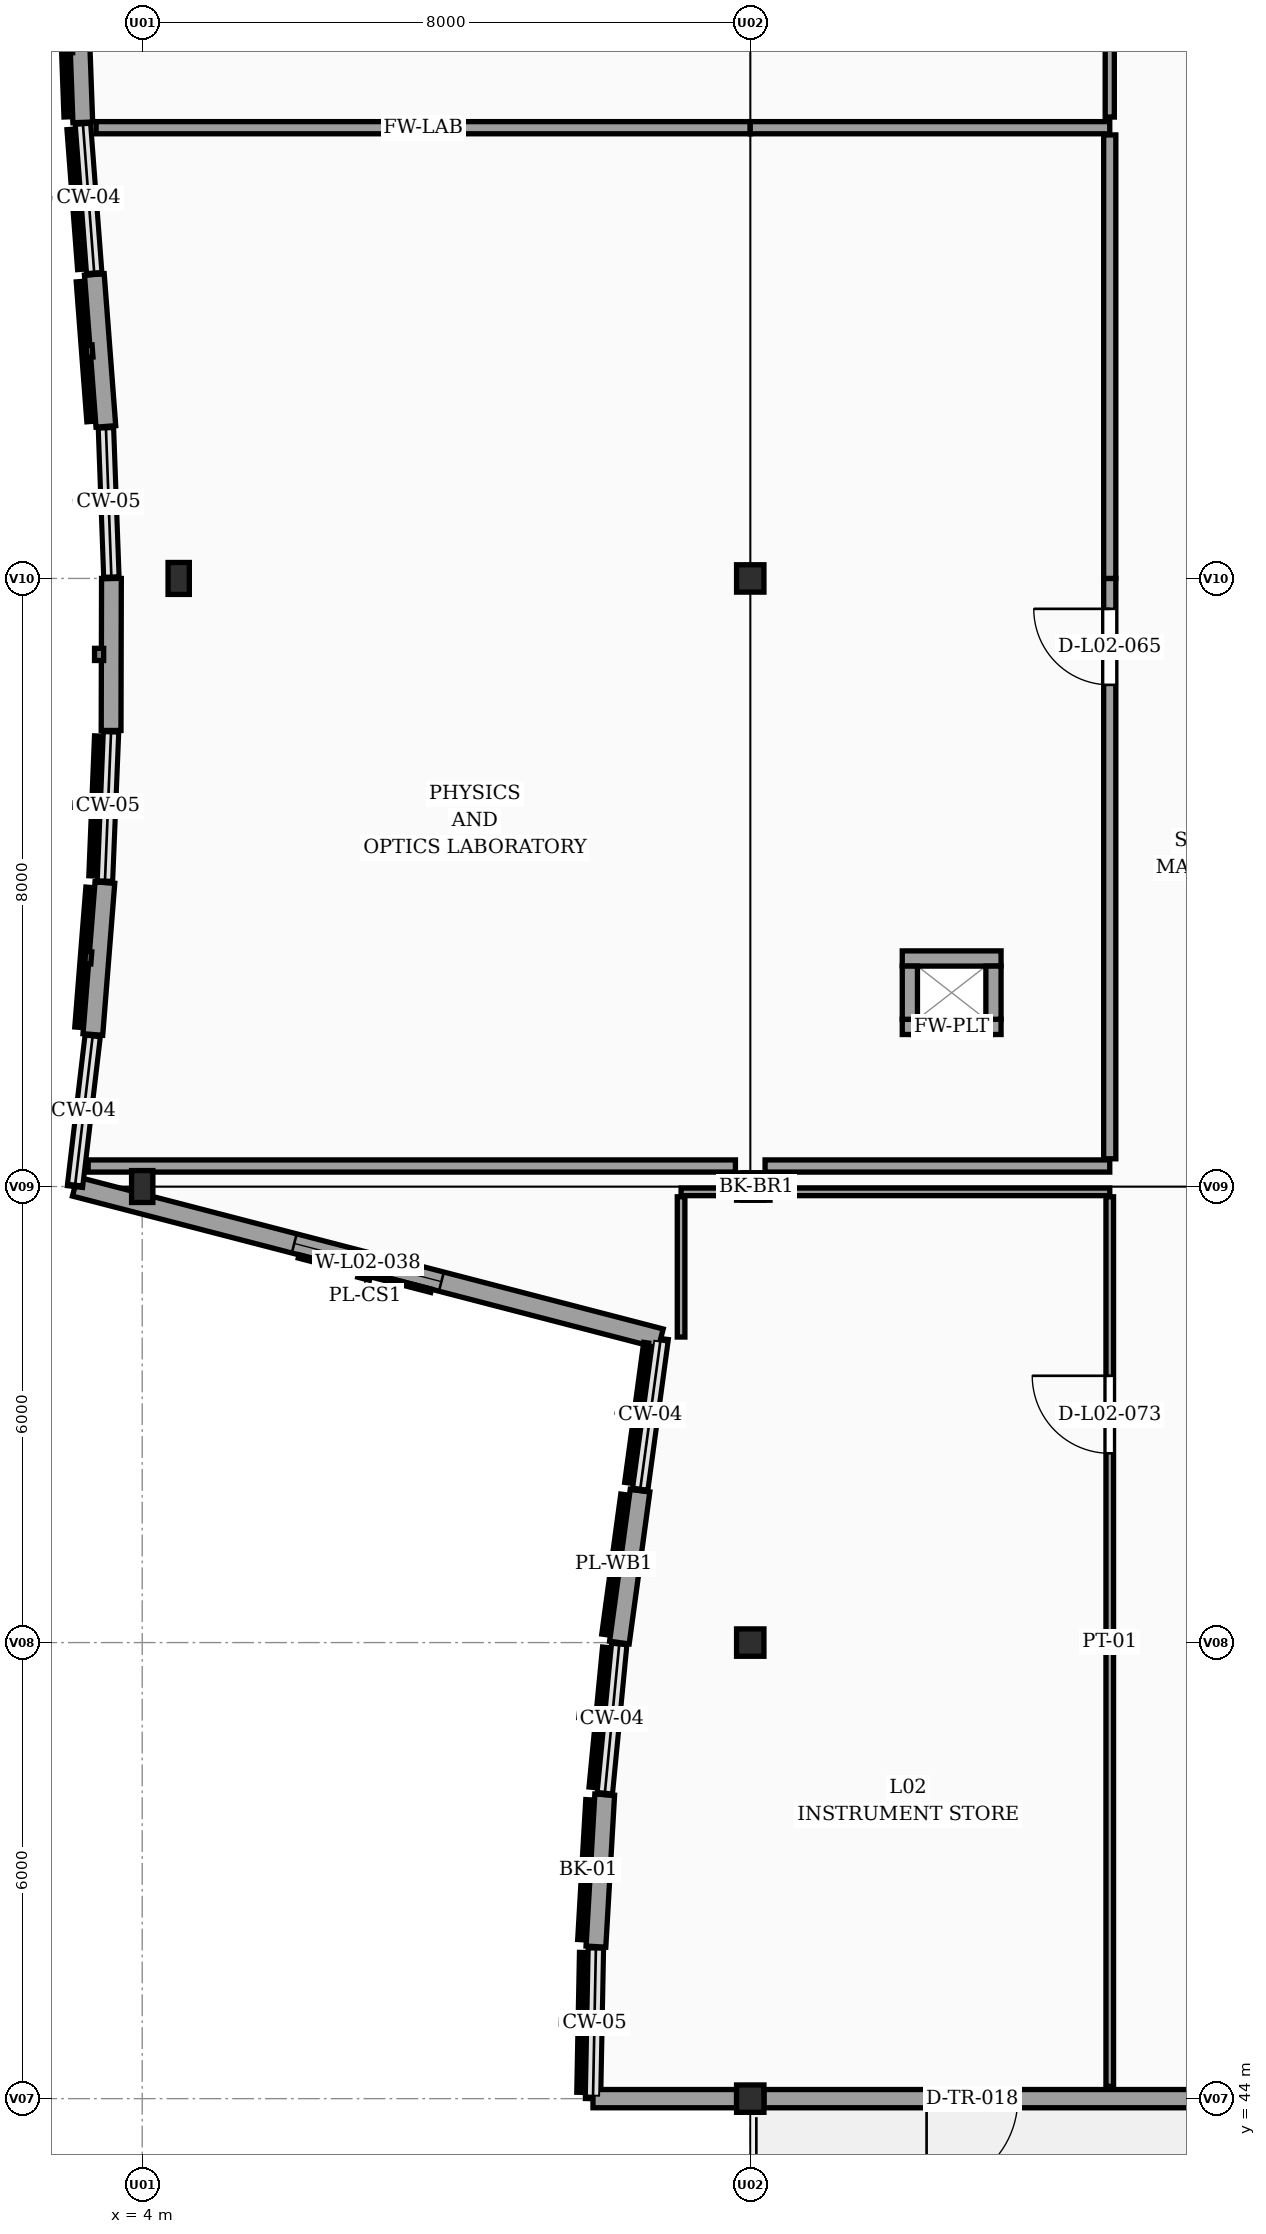
"""IFC4 building model, lengths in metres.
Left out: names, types, materials, properties, quantities, classifications, styles, units other than length and angle.
Written with IfcOpenShell. Run it as: python <this file> out.ifc"""

import sys

from ifc_helpers import new_model, si_unit, direction, frame, frame_2d, origin, origin_2d, place, context, subcontext, project, spatial, rectangle, extrude, element, fill, save


model = new_model("IFC4")
c1 = context("Model", 3, precision=1e-05, world=origin(), true_north=direction((0.0, 1.0)))
c2 = subcontext(c1, "Body", "Model", "MODEL_VIEW")
j1 = project(units=[si_unit("LENGTHUNIT", "METRE"), si_unit("PLANEANGLEUNIT", "RADIAN")], contexts=[c1])
p1 = place(None, origin())
s1 = spatial("IfcSite", under=j1, at=p1, CompositionType="ELEMENT")
p2 = place(p1, origin())
s2 = spatial("IfcBuilding", under=s1, at=p2, CompositionType="ELEMENT")
p3 = place(p2, frame((0.0, 0.0, 8.4)))
s3 = spatial("IfcBuildingStorey", under=s2, at=p3, CompositionType="ELEMENT", Elevation=8.4)
for number, where, z_axis, x_axis in (
    (1, (4.0, 56.0, 0.0), (0.0, 0.0, 1.0), (1.0, 0.0, 0.0)),
    (2, (4.48, 64.0, 0.0), (0.0, 0.0, 1.0), (1.0, 0.0, 0.0)),
):
    element("IfcColumn", number, at=place(p3, frame(where, z_axis=z_axis, x_axis=x_axis)), inside=s3, PredefinedType="PILASTER", context=c2, shape_type="SweptSolid", body=[
        extrude(rectangle(XDim=0.28, YDim=0.42, at=origin_2d()), origin(), (0.0, 0.0, 1.0), 3.9),
    ])
for number, where, z_axis, x_axis in (
    (3, (12.0, 44.0, 0.0), (0.0, 0.0, 1.0), (1.0, 0.0, 0.0)),
    (4, (12.0, 50.0, 0.0), (0.0, 0.0, 1.0), (1.0, 0.0, 0.0)),
    (5, (12.0, 56.0, 0.0), (0.0, 0.0, 1.0), (1.0, 0.0, 0.0)),
    (6, (12.0, 64.0, 0.0), (0.0, 0.0, 1.0), (1.0, 0.0, 0.0)),
):
    element("IfcColumn", number, at=place(p3, frame(where, z_axis=z_axis, x_axis=x_axis)), inside=s3, PredefinedType="COLUMN", context=c2, shape_type="SweptSolid", body=[
        extrude(rectangle(XDim=0.36, YDim=0.36, at=origin_2d()), origin(), (0.0, 0.0, 1.0), 3.9),
    ])
p4 = place(p3, frame((9.931, 44.0, 0.0), z_axis=(0.0, 0.0, 1.0), x_axis=(0.019283523045, 0.999814055582, 0.0)))
e7 = element("IfcWall", 7, at=p4, inside=s3, PredefinedType="SOLIDWALL", context=c2, shape_type="SweptSolid", body=[
    extrude(rectangle(XDim=2.0, YDim=0.2, at=frame_2d((1.0, 0.0))), origin(), (0.0, 0.0, 1.0), 0.95),
])
p5 = place(p3, frame((9.969, 46.0, 0.0), z_axis=(0.0, 0.0, 1.0), x_axis=(0.057643251596, 0.998337245396, 0.0)))
e8 = element("IfcWall", 8, at=p5, inside=s3, PredefinedType="SOLIDWALL", context=c2, shape_type="SweptSolid", body=[
    extrude(rectangle(XDim=2.003, YDim=0.26, at=frame_2d((1.002, 0.0))), origin(), (0.0, 0.0, 1.0), 3.65),
])
p6 = place(p3, frame((10.085, 48.0, 0.0), z_axis=(0.0, 0.0, 1.0), x_axis=(0.09623099978, 0.99535902803, 0.0)))
e9 = element("IfcWall", 9, at=p6, inside=s3, PredefinedType="SOLIDWALL", context=c2, shape_type="SweptSolid", body=[
    extrude(rectangle(XDim=2.009, YDim=0.2, at=frame_2d((1.005, 0.0))), origin(), (0.0, 0.0, 1.0), 0.95),
])
p7 = place(p3, frame((10.278, 50.0, 0.0), z_axis=(0.0, 0.0, 1.0), x_axis=(0.134627389588, 0.990896294257, 0.0)))
e10 = element("IfcWall", 10, at=p7, inside=s3, PredefinedType="SOLIDWALL", context=c2, shape_type="SweptSolid", body=[
    extrude(rectangle(XDim=2.018, YDim=0.26, at=frame_2d((1.009, 0.0))), origin(), (0.0, 0.0, 1.0), 3.65),
])
p8 = place(p3, frame((10.55, 52.0, 0.0), z_axis=(0.0, 0.0, 1.0), x_axis=(0.134627389588, 0.990896294257, 0.0)))
e11 = element("IfcWall", 11, at=p8, inside=s3, PredefinedType="SOLIDWALL", context=c2, shape_type="SweptSolid", body=[
    extrude(rectangle(XDim=2.018, YDim=0.2, at=frame_2d((1.009, 0.0))), origin(), (0.0, 0.0, 1.0), 0.95),
])
p9 = place(p3, frame((10.822, 54.0, 0.0), z_axis=(0.0, 0.0, 1.0), x_axis=(-0.967937555254, 0.251190941573, 0.0)))
e12 = element("IfcWall", 12, at=p9, inside=s3, PredefinedType="SOLIDWALL", context=c2, shape_type="SweptSolid", body=[
    extrude(rectangle(XDim=7.962, YDim=0.26, at=frame_2d((3.981, 0.0))), origin(), (0.0, 0.0, 1.0), 3.65),
])
p10 = place(p9, frame((2.981, 0.0, 0.95)))
e13 = element("IfcOpeningElement", 13, at=p10, cuts=e12, PredefinedType="OPENING", context=c2, shape_type="SweptSolid", body=[
    extrude(rectangle(XDim=2.0, YDim=1.5, at=frame_2d((1.0, 0.75))), frame((0.0, 0.14, 0.0), z_axis=(0.0, -1.0, 0.0), x_axis=(1.0, 0.0, 0.0)), (0.0, 0.0, 1.0), 0.28),
])
p11 = place(p3, frame((3.115, 56.0, 0.0), z_axis=(0.0, 0.0, 1.0), x_axis=(0.116988959085, 0.99313321536, 0.0)))
e14 = element("IfcWall", 14, at=p11, inside=s3, PredefinedType="SOLIDWALL", context=c2, shape_type="SweptSolid", body=[
    extrude(rectangle(XDim=2.014, YDim=0.2, at=frame_2d((1.007, 0.0))), origin(), (0.0, 0.0, 1.0), 0.95),
])
p12 = place(p3, frame((3.351, 58.0, 0.0), z_axis=(0.0, 0.0, 1.0), x_axis=(0.078976178075, 0.996876503533, 0.0)))
e15 = element("IfcWall", 15, at=p12, inside=s3, PredefinedType="SOLIDWALL", context=c2, shape_type="SweptSolid", body=[
    extrude(rectangle(XDim=2.006, YDim=0.26, at=frame_2d((1.003, 0.0))), origin(), (0.0, 0.0, 1.0), 3.65),
])
p13 = place(p3, frame((3.509, 60.0, 0.0), z_axis=(0.0, 0.0, 1.0), x_axis=(0.040737639062, 0.99916987783, 0.0)))
e16 = element("IfcWall", 16, at=p13, inside=s3, PredefinedType="SOLIDWALL", context=c2, shape_type="SweptSolid", body=[
    extrude(rectangle(XDim=2.002, YDim=0.2, at=frame_2d((1.001, 0.0))), origin(), (0.0, 0.0, 1.0), 0.95),
])
p14 = place(p3, frame((3.591, 62.0, 0.0), z_axis=(0.0, 0.0, 1.0), x_axis=(0.002197260321, 0.999997586021, 0.0)))
e17 = element("IfcWall", 17, at=p14, inside=s3, PredefinedType="SOLIDWALL", context=c2, shape_type="SweptSolid", body=[
    extrude(rectangle(XDim=2.0, YDim=0.26, at=frame_2d((1.0, 0.0))), origin(), (0.0, 0.0, 1.0), 3.65),
])
p15 = place(p3, frame((3.595, 64.0, 0.0), z_axis=(0.0, 0.0, 1.0), x_axis=(-0.036596562065, 0.999330121454, 0.0)))
e18 = element("IfcWall", 18, at=p15, inside=s3, PredefinedType="SOLIDWALL", context=c2, shape_type="SweptSolid", body=[
    extrude(rectangle(XDim=2.001, YDim=0.2, at=frame_2d((1.0, 0.0))), origin(), (0.0, 0.0, 1.0), 0.95),
])
p16 = place(p3, frame((3.522, 66.0, 0.0), z_axis=(0.0, 0.0, 1.0), x_axis=(-0.075588789742, 0.997139074987, 0.0)))
e19 = element("IfcWall", 19, at=p16, inside=s3, PredefinedType="SOLIDWALL", context=c2, shape_type="SweptSolid", body=[
    extrude(rectangle(XDim=2.006, YDim=0.26, at=frame_2d((1.003, 0.0))), origin(), (0.0, 0.0, 1.0), 3.65),
])
p17 = place(p3, frame((3.37, 68.0, 0.0), z_axis=(0.0, 0.0, 1.0), x_axis=(-0.075709813676, 0.9971298933, 0.0)))
e20 = element("IfcWall", 20, at=p17, inside=s3, PredefinedType="SOLIDWALL", context=c2, shape_type="SweptSolid", body=[
    extrude(rectangle(XDim=2.006, YDim=0.2, at=frame_2d((1.003, 0.0))), origin(), (0.0, 0.0, 1.0), 0.95),
])
p18 = place(p3, frame((3.218, 70.0, 0.0), z_axis=(0.0, 0.0, 1.0), x_axis=(-0.036596562065, 0.999330121454, 0.0)))
e21 = element("IfcWall", 21, at=p18, inside=s3, PredefinedType="SOLIDWALL", context=c2, shape_type="SweptSolid", body=[
    extrude(rectangle(XDim=2.001, YDim=0.26, at=frame_2d((1.0, 0.0))), origin(), (0.0, 0.0, 1.0), 3.65),
])
p19 = place(p3, frame((19.82, 44.0, 0.0), z_axis=(0.0, 0.0, 1.0), x_axis=(-1.0, 0.0, 0.0)))
e22 = element("IfcWall", 22, at=p19, inside=s3, PredefinedType="SOLIDWALL", context=c2, shape_type="SweptSolid", body=[
    extrude(rectangle(XDim=7.64, YDim=0.24, at=frame_2d((3.82, 0.0))), origin(), (0.0, 0.0, 1.0), 3.088),
])
p20 = place(p19, frame((4.3, 0.0, 0.0)))
e23 = element("IfcOpeningElement", 23, at=p20, cuts=e22, PredefinedType="OPENING", context=c2, shape_type="SweptSolid", body=[
    extrude(rectangle(XDim=1.2, YDim=2.15, at=frame_2d((0.6, 1.075))), frame((0.0, 0.13, 0.0), z_axis=(0.0, -1.0, 0.0), x_axis=(1.0, 0.0, 0.0)), (0.0, 0.0, 1.0), 0.26),
])
p21 = place(p3, frame((11.82, 44.0, 0.0), z_axis=(0.0, 0.0, 1.0), x_axis=(-1.0, 0.0, 0.0)))
e24 = element("IfcWall", 24, at=p21, inside=s3, PredefinedType="SOLIDWALL", context=c2, shape_type="SweptSolid", body=[
    extrude(rectangle(XDim=1.889, YDim=0.24, at=frame_2d((0.945, 0.0))), origin(), (0.0, 0.0, 1.0), 3.09),
])
for number, where, z_axis, x_axis in (
    (25, (15.3, 58.1, 0.0), (0.0, 0.0, 1.0), (-1.0, 0.0, 0.0)),
    (26, (14.0, 59.0, 0.0), (0.0, 0.0, 1.0), (1.0, 0.0, 0.0)),
):
    element("IfcWall", number, at=place(p3, frame(where, z_axis=z_axis, x_axis=x_axis)), inside=s3, PredefinedType="PARTITIONING", context=c2, shape_type="SweptSolid", body=[
        extrude(rectangle(XDim=1.3, YDim=0.2, at=frame_2d((0.65, 0.0))), origin(), (0.0, 0.0, 1.0), 3.65),
    ])
for number, where, z_axis, x_axis in (
    (27, (14.1, 58.2, 0.0), (0.0, 0.0, 1.0), (0.0, 1.0, 0.0)),
    (28, (15.2, 58.9, 0.0), (0.0, 0.0, 1.0), (0.0, -1.0, 0.0)),
):
    element("IfcWall", number, at=place(p3, frame(where, z_axis=z_axis, x_axis=x_axis)), inside=s3, PredefinedType="PARTITIONING", context=c2, shape_type="SweptSolid", body=[
        extrude(rectangle(XDim=0.7, YDim=0.2, at=frame_2d((0.35, 0.0))), origin(), (0.0, 0.0, 1.0), 3.65),
    ])
p22 = place(p3, frame((3.289, 56.27, 0.0), z_axis=(0.0, 0.0, 1.0), x_axis=(1.0, 0.0, 0.0)))
e29 = element("IfcWall", 29, at=p22, inside=s3, PredefinedType="PARTITIONING", context=c2, shape_type="SweptSolid", body=[
    extrude(rectangle(XDim=8.516, YDim=0.16, at=frame_2d((4.258, 0.0))), origin(), (0.0, 0.0, 1.0), 3.09),
])
p23 = place(p3, frame((12.195, 56.27, 0.0), z_axis=(0.0, 0.0, 1.0), x_axis=(1.0, 0.0, 0.0)))
e30 = element("IfcWall", 30, at=p23, inside=s3, PredefinedType="PARTITIONING", context=c2, shape_type="SweptSolid", body=[
    extrude(rectangle(XDim=4.535, YDim=0.16, at=frame_2d((2.268, 0.0))), origin(), (0.0, 0.0, 1.0), 3.088),
])
p24 = place(p3, frame((3.393, 69.93, 0.0), z_axis=(0.0, 0.0, 1.0), x_axis=(1.0, 0.0, 0.0)))
e31 = element("IfcWall", 31, at=p24, inside=s3, PredefinedType="PARTITIONING", context=c2, shape_type="SweptSolid", body=[
    extrude(rectangle(XDim=8.607, YDim=0.16, at=frame_2d((4.304, 0.0))), origin(), (0.0, 0.0, 1.0), 3.65),
])
p25 = place(p3, frame((12.0, 69.93, 0.0), z_axis=(0.0, 0.0, 1.0), x_axis=(1.0, 0.0, 0.0)))
e32 = element("IfcWall", 32, at=p25, inside=s3, PredefinedType="PARTITIONING", context=c2, shape_type="SweptSolid", body=[
    extrude(rectangle(XDim=4.73, YDim=0.16, at=frame_2d((2.365, 0.0))), origin(), (0.0, 0.0, 1.0), 3.65),
])
p26 = place(p3, frame((16.73, 56.365, 0.0), z_axis=(0.0, 0.0, 1.0), x_axis=(0.0, 1.0, 0.0)))
e33 = element("IfcWall", 33, at=p26, inside=s3, PredefinedType="PARTITIONING", context=c2, shape_type="SweptSolid", body=[
    extrude(rectangle(XDim=7.635, YDim=0.16, at=frame_2d((3.817, 0.0))), origin(), (0.0, 0.0, 1.0), 3.65),
])
p27 = place(p26, frame((6.235, 0.0, 0.0)))
e34 = element("IfcOpeningElement", 34, at=p27, cuts=e33, PredefinedType="OPENING", context=c2, shape_type="SweptSolid", body=[
    extrude(rectangle(XDim=1.0, YDim=2.15, at=frame_2d((0.5, 1.075))), frame((0.0, 0.09, 0.0), z_axis=(0.0, -1.0, 0.0), x_axis=(1.0, 0.0, 0.0)), (0.0, 0.0, 1.0), 0.18),
])
p28 = place(p3, frame((16.73, 64.0, 0.0), z_axis=(0.0, 0.0, 1.0), x_axis=(0.0, 1.0, 0.0)))
e35 = element("IfcWall", 35, at=p28, inside=s3, PredefinedType="PARTITIONING", context=c2, shape_type="SweptSolid", body=[
    extrude(rectangle(XDim=5.835, YDim=0.16, at=frame_2d((2.917, 0.0))), origin(), (0.0, 0.0, 1.0), 3.65),
])
p29 = place(p3, frame((16.73, 70.07, 0.0), z_axis=(0.0, 0.0, 1.0), x_axis=(0.0, 1.0, 0.0)))
e36 = element("IfcWall", 36, at=p29, inside=s3, PredefinedType="PARTITIONING", context=c2, shape_type="SweptSolid", body=[
    extrude(rectangle(XDim=1.93, YDim=0.12, at=frame_2d((0.965, 0.0))), origin(), (0.0, 0.0, 1.0), 3.65),
])
p30 = place(p3, frame((11.09, 55.93, 0.0), z_axis=(0.0, 0.0, 1.0), x_axis=(1.0, 0.0, 0.0)))
e37 = element("IfcWall", 37, at=p30, inside=s3, PredefinedType="PARTITIONING", context=c2, shape_type="SweptSolid", body=[
    extrude(rectangle(XDim=5.64, YDim=0.1, at=frame_2d((2.82, 0.0))), origin(), (0.0, 0.0, 1.0), 3.088),
])
p31 = place(p3, frame((11.09, 54.02, 0.0), z_axis=(0.0, 0.0, 1.0), x_axis=(0.0, 1.0, 0.0)))
e38 = element("IfcWall", 38, at=p31, inside=s3, PredefinedType="PARTITIONING", context=c2, shape_type="SweptSolid", body=[
    extrude(rectangle(XDim=1.845, YDim=0.1, at=frame_2d((0.922, 0.0))), origin(), (0.0, 0.0, 1.0), 3.65),
])
p32 = place(p3, frame((16.73, 44.162, 0.0), z_axis=(0.0, 0.0, 1.0), x_axis=(0.0, 1.0, 0.0)))
e39 = element("IfcWall", 39, at=p32, inside=s3, PredefinedType="PARTITIONING", context=c2, shape_type="SweptSolid", body=[
    extrude(rectangle(XDim=11.703, YDim=0.1, at=frame_2d((5.852, 0.0))), origin(), (0.0, 0.0, 1.0), 3.65),
])
p33 = place(p32, frame((8.328, 0.0, 0.0)))
e40 = element("IfcOpeningElement", 40, at=p33, cuts=e39, PredefinedType="OPENING", context=c2, shape_type="SweptSolid", body=[
    extrude(rectangle(XDim=1.02, YDim=2.1, at=frame_2d((0.51, 1.05))), frame((0.0, 0.06, 0.0), z_axis=(0.0, -1.0, 0.0), x_axis=(1.0, 0.0, 0.0)), (0.0, 0.0, 1.0), 0.12),
])
p34 = place(p10, origin())
e41 = element("IfcWindow", 41, at=p34, inside=s3, PartitioningType="DOUBLE_PANEL_VERTICAL", PredefinedType="WINDOW", context=c2, shape_type="SweptSolid", body=[
    extrude(rectangle(XDim=2.0, YDim=1.5, at=frame_2d((1.0, 0.75))), frame((0.0, 0.03, 0.0), z_axis=(0.0, -1.0, 0.0), x_axis=(1.0, 0.0, 0.0)), (0.0, 0.0, 1.0), 0.06),
])
fill(e13, e41)
p35 = place(p20, origin())
e42 = element("IfcDoor", 42, at=p35, inside=s3, OperationType="SINGLE_SWING_RIGHT", PredefinedType="DOOR", context=c2, shape_type="SweptSolid", body=[
    extrude(rectangle(XDim=1.2, YDim=2.15, at=frame_2d((0.6, 1.075))), frame((0.0, 0.025, 0.0), z_axis=(0.0, -1.0, 0.0), x_axis=(1.0, 0.0, 0.0)), (0.0, 0.0, 1.0), 0.05),
])
fill(e23, e42)
p36 = place(p27, origin())
e43 = element("IfcDoor", 43, at=p36, inside=s3, OperationType="SINGLE_SWING_RIGHT", PredefinedType="DOOR", context=c2, shape_type="SweptSolid", body=[
    extrude(rectangle(XDim=1.0, YDim=2.15, at=frame_2d((0.5, 1.075))), frame((0.0, 0.025, 0.0), z_axis=(0.0, -1.0, 0.0), x_axis=(1.0, 0.0, 0.0)), (0.0, 0.0, 1.0), 0.05),
])
fill(e34, e43)
p37 = place(p33, origin())
e44 = element("IfcDoor", 44, at=p37, inside=s3, OperationType="SINGLE_SWING_RIGHT", PredefinedType="DOOR", context=c2, shape_type="SweptSolid", body=[
    extrude(rectangle(XDim=1.02, YDim=2.1, at=frame_2d((0.51, 1.05))), frame((0.0, 0.025, 0.0), z_axis=(0.0, -1.0, 0.0), x_axis=(1.0, 0.0, 0.0)), (0.0, 0.0, 1.0), 0.05),
])
fill(e40, e44)
save(model, sys.argv[1])
